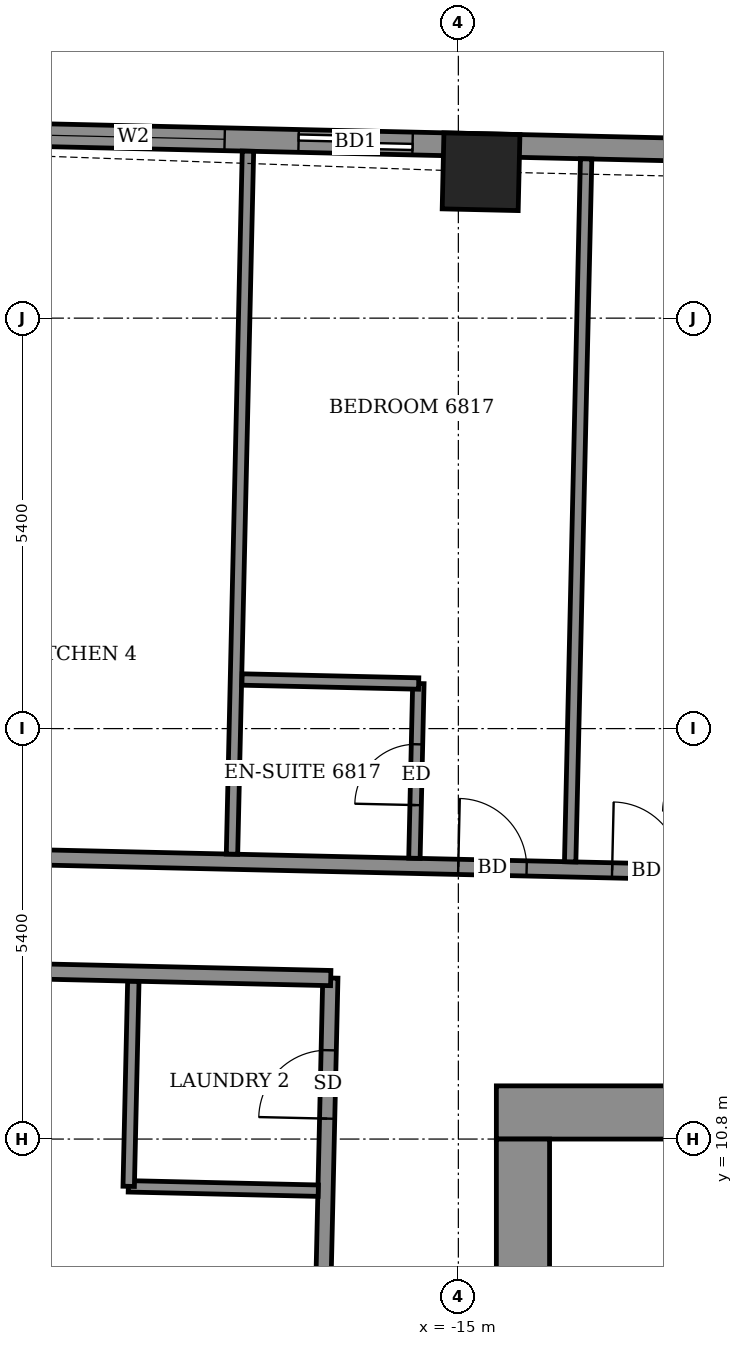
"""IFC4 building model, lengths in metres.
Left out: names, types, materials, properties, quantities, classifications, styles, units other than length and angle.
Written with IfcOpenShell. Run it as: python <this file> out.ifc"""

import sys

from ifc_helpers import new_model, si_unit, direction, frame, frame_2d, origin, origin_2d, place, context, subcontext, project, spatial, rectangle, extrude, element, fill, save


model = new_model("IFC4")
c1 = context("Model", 3, precision=1e-05, world=origin(), true_north=direction((0.0, 1.0)))
c2 = subcontext(c1, "Body", "Model", "MODEL_VIEW")
j1 = project(units=[si_unit("LENGTHUNIT", "METRE"), si_unit("PLANEANGLEUNIT", "RADIAN")], contexts=[c1])
p1 = place(None, origin())
s1 = spatial("IfcSite", under=j1, at=p1, CompositionType="ELEMENT")
p2 = place(p1, origin())
s2 = spatial("IfcBuilding", under=s1, at=p2, CompositionType="ELEMENT")
p3 = place(p2, frame((0.0, 0.0, 268.1)))
s3 = spatial("IfcBuildingStorey", under=s2, at=p3, CompositionType="ELEMENT", Elevation=268.1)
p4 = place(p3, frame((-14.701, 23.526, -0.55), z_axis=(0.0, 0.0, 1.0), x_axis=(-0.999741948423, 0.022716438162, 0.0)))
e1 = element("IfcColumn", 1, at=p4, inside=s3, PredefinedType="COLUMN", context=c2, shape_type="SweptSolid", body=[
    extrude(rectangle(XDim=1.0, YDim=1.0, at=origin_2d()), origin(), (0.0, 0.0, 1.0), 3.6),
])
p5 = place(p3, frame((26.35, 22.945, 0.0), z_axis=(0.0, 0.0, 1.0), x_axis=(-0.999742523712, 0.022691105788, 0.0)))
e2 = element("IfcWall", 2, at=p5, inside=s3, PredefinedType="SOLIDWALL", context=c2, shape_type="SweptSolid", body=[
    extrude(rectangle(XDim=47.771, YDim=0.3, at=frame_2d((23.886, 0.0))), origin(), (0.0, 0.0, 1.0), 2.55),
])
p6 = place(p5, frame((1.954, 0.0, 0.0)))
e3 = element("IfcOpeningElement", 3, at=p6, cuts=e2, PredefinedType="OPENING", context=c2, shape_type="SweptSolid", body=[
    extrude(rectangle(XDim=1.5, YDim=2.4, at=frame_2d((0.75, 1.2))), frame((0.0, 0.16, 0.0), z_axis=(0.0, -1.0, 0.0), x_axis=(1.0, 0.0, 0.0)), (0.0, 0.0, 1.0), 0.32),
])
p7 = place(p5, frame((7.37, 0.0, 0.0)))
e4 = element("IfcOpeningElement", 4, at=p7, cuts=e2, PredefinedType="OPENING", context=c2, shape_type="SweptSolid", body=[
    extrude(rectangle(XDim=1.5, YDim=2.4, at=frame_2d((0.75, 1.2))), frame((0.0, 0.16, 0.0), z_axis=(0.0, -1.0, 0.0), x_axis=(1.0, 0.0, 0.0)), (0.0, 0.0, 1.0), 0.32),
])
p8 = place(p5, frame((10.554, 0.0, 0.0)))
e5 = element("IfcOpeningElement", 5, at=p8, cuts=e2, PredefinedType="OPENING", context=c2, shape_type="SweptSolid", body=[
    extrude(rectangle(XDim=1.5, YDim=2.4, at=frame_2d((0.75, 1.2))), frame((0.0, 0.16, 0.0), z_axis=(0.0, -1.0, 0.0), x_axis=(1.0, 0.0, 0.0)), (0.0, 0.0, 1.0), 0.32),
])
p9 = place(p5, frame((15.104, 0.0, 0.0)))
e6 = element("IfcOpeningElement", 6, at=p9, cuts=e2, PredefinedType="OPENING", context=c2, shape_type="SweptSolid", body=[
    extrude(rectangle(XDim=1.5, YDim=2.4, at=frame_2d((0.75, 1.2))), frame((0.0, 0.16, 0.0), z_axis=(0.0, -1.0, 0.0), x_axis=(1.0, 0.0, 0.0)), (0.0, 0.0, 1.0), 0.32),
])
p10 = place(p5, frame((18.287, 0.0, 0.0)))
e7 = element("IfcOpeningElement", 7, at=p10, cuts=e2, PredefinedType="OPENING", context=c2, shape_type="SweptSolid", body=[
    extrude(rectangle(XDim=1.5, YDim=2.4, at=frame_2d((0.75, 1.2))), frame((0.0, 0.16, 0.0), z_axis=(0.0, -1.0, 0.0), x_axis=(1.0, 0.0, 0.0)), (0.0, 0.0, 1.0), 0.32),
])
p11 = place(p5, frame((23.622, 0.0, 0.0)))
e8 = element("IfcOpeningElement", 8, at=p11, cuts=e2, PredefinedType="OPENING", context=c2, shape_type="SweptSolid", body=[
    extrude(rectangle(XDim=1.5, YDim=2.4, at=frame_2d((0.75, 1.2))), frame((0.0, 0.16, 0.0), z_axis=(0.0, -1.0, 0.0), x_axis=(1.0, 0.0, 0.0)), (0.0, 0.0, 1.0), 0.32),
])
p12 = place(p5, frame((28.521, 0.0, 0.0)))
e9 = element("IfcOpeningElement", 9, at=p12, cuts=e2, PredefinedType="OPENING", context=c2, shape_type="SweptSolid", body=[
    extrude(rectangle(XDim=1.5, YDim=2.4, at=frame_2d((0.75, 1.2))), frame((0.0, 0.16, 0.0), z_axis=(0.0, -1.0, 0.0), x_axis=(1.0, 0.0, 0.0)), (0.0, 0.0, 1.0), 0.32),
])
p13 = place(p5, frame((31.705, 0.0, 0.0)))
e10 = element("IfcOpeningElement", 10, at=p13, cuts=e2, PredefinedType="OPENING", context=c2, shape_type="SweptSolid", body=[
    extrude(rectangle(XDim=1.5, YDim=2.4, at=frame_2d((0.75, 1.2))), frame((0.0, 0.16, 0.0), z_axis=(0.0, -1.0, 0.0), x_axis=(1.0, 0.0, 0.0)), (0.0, 0.0, 1.0), 0.32),
])
p14 = place(p5, frame((36.722, 0.0, 0.0)))
e11 = element("IfcOpeningElement", 11, at=p14, cuts=e2, PredefinedType="OPENING", context=c2, shape_type="SweptSolid", body=[
    extrude(rectangle(XDim=1.5, YDim=2.4, at=frame_2d((0.75, 1.2))), frame((0.0, 0.16, 0.0), z_axis=(0.0, -1.0, 0.0), x_axis=(1.0, 0.0, 0.0)), (0.0, 0.0, 1.0), 0.32),
])
p15 = place(p5, frame((41.963, 0.0, 0.0)))
e12 = element("IfcOpeningElement", 12, at=p15, cuts=e2, PredefinedType="OPENING", context=c2, shape_type="SweptSolid", body=[
    extrude(rectangle(XDim=1.5, YDim=2.4, at=frame_2d((0.75, 1.2))), frame((0.0, 0.16, 0.0), z_axis=(0.0, -1.0, 0.0), x_axis=(1.0, 0.0, 0.0)), (0.0, 0.0, 1.0), 0.32),
])
p16 = place(p5, frame((44.436, 0.0, 0.9)))
e13 = element("IfcOpeningElement", 13, at=p16, cuts=e2, PredefinedType="OPENING", context=c2, shape_type="SweptSolid", body=[
    extrude(rectangle(XDim=2.4, YDim=1.5, at=frame_2d((1.2, 0.75))), frame((0.0, 0.16, 0.0), z_axis=(0.0, -1.0, 0.0), x_axis=(1.0, 0.0, 0.0)), (0.0, 0.0, 1.0), 0.32),
])
p17 = place(p3, frame((-17.262, -12.525, 0.0), z_axis=(0.0, 0.0, 1.0), x_axis=(0.022706151961, 0.999742182097, 0.0)))
e14 = element("IfcWall", 14, at=p17, inside=s3, PredefinedType="PARTITIONING", context=c2, shape_type="SweptSolid", body=[
    extrude(rectangle(XDim=25.45, YDim=0.2, at=frame_2d((12.725, 0.0))), origin(), (0.0, 0.0, 1.0), 3.05),
])
p18 = place(p17, frame((19.913, 0.0, 0.0)))
e15 = element("IfcOpeningElement", 15, at=p18, cuts=e14, PredefinedType="OPENING", context=c2, shape_type="SweptSolid", body=[
    extrude(rectangle(XDim=1.0, YDim=2.1, at=frame_2d((0.5, 1.05))), frame((0.0, 0.11, 0.0), z_axis=(0.0, -1.0, 0.0), x_axis=(1.0, 0.0, 0.0)), (0.0, 0.0, 1.0), 0.22),
])
p19 = place(p17, frame((23.6, 0.0, 0.0)))
e16 = element("IfcOpeningElement", 16, at=p19, cuts=e14, PredefinedType="OPENING", context=c2, shape_type="SweptSolid", body=[
    extrude(rectangle(XDim=0.9, YDim=2.1, at=frame_2d((0.45, 1.05))), frame((0.0, 0.11, 0.0), z_axis=(0.0, -1.0, 0.0), x_axis=(1.0, 0.0, 0.0)), (0.0, 0.0, 1.0), 0.22),
])
p20 = place(p17, frame((14.325, 0.0, 0.0)))
e17 = element("IfcOpeningElement", 17, at=p20, cuts=e14, PredefinedType="OPENING", context=c2, shape_type="SweptSolid", body=[
    extrude(rectangle(XDim=1.0, YDim=2.1, at=frame_2d((0.5, 1.05))), frame((0.0, 0.11, 0.0), z_axis=(0.0, -1.0, 0.0), x_axis=(1.0, 0.0, 0.0)), (0.0, 0.0, 1.0), 0.22),
])
p21 = place(p17, frame((16.525, 0.0, 0.0)))
e18 = element("IfcOpeningElement", 18, at=p21, cuts=e14, PredefinedType="OPENING", context=c2, shape_type="SweptSolid", body=[
    extrude(rectangle(XDim=0.9, YDim=2.1, at=frame_2d((0.45, 1.05))), frame((0.0, 0.11, 0.0), z_axis=(0.0, -1.0, 0.0), x_axis=(1.0, 0.0, 0.0)), (0.0, 0.0, 1.0), 0.22),
])
p22 = place(p17, frame((9.85, 0.0, 0.0)))
e19 = element("IfcOpeningElement", 19, at=p22, cuts=e14, PredefinedType="OPENING", context=c2, shape_type="SweptSolid", body=[
    extrude(rectangle(XDim=1.0, YDim=2.1, at=frame_2d((0.5, 1.05))), frame((0.0, 0.11, 0.0), z_axis=(0.0, -1.0, 0.0), x_axis=(1.0, 0.0, 0.0)), (0.0, 0.0, 1.0), 0.22),
])
p23 = place(p17, frame((12.125, 0.0, 0.0)))
e20 = element("IfcOpeningElement", 20, at=p23, cuts=e14, PredefinedType="OPENING", context=c2, shape_type="SweptSolid", body=[
    extrude(rectangle(XDim=0.9, YDim=2.1, at=frame_2d((0.45, 1.05))), frame((0.0, 0.11, 0.0), z_axis=(0.0, -1.0, 0.0), x_axis=(1.0, 0.0, 0.0)), (0.0, 0.0, 1.0), 0.22),
])
p24 = place(p17, frame((7.725, 0.0, 0.0)))
e21 = element("IfcOpeningElement", 21, at=p24, cuts=e14, PredefinedType="OPENING", context=c2, shape_type="SweptSolid", body=[
    extrude(rectangle(XDim=1.0, YDim=2.1, at=frame_2d((0.5, 1.05))), frame((0.0, 0.11, 0.0), z_axis=(0.0, -1.0, 0.0), x_axis=(1.0, 0.0, 0.0)), (0.0, 0.0, 1.0), 0.22),
])
p25 = place(p17, frame((5.275, 0.0, 0.0)))
e22 = element("IfcOpeningElement", 22, at=p25, cuts=e14, PredefinedType="OPENING", context=c2, shape_type="SweptSolid", body=[
    extrude(rectangle(XDim=0.9, YDim=2.1, at=frame_2d((0.45, 1.05))), frame((0.0, 0.11, 0.0), z_axis=(0.0, -1.0, 0.0), x_axis=(1.0, 0.0, 0.0)), (0.0, 0.0, 1.0), 0.22),
])
p26 = place(p17, frame((0.512, 0.0, 0.0)))
e23 = element("IfcOpeningElement", 23, at=p26, cuts=e14, PredefinedType="OPENING", context=c2, shape_type="SweptSolid", body=[
    extrude(rectangle(XDim=1.0, YDim=2.1, at=frame_2d((0.5, 1.05))), frame((0.0, 0.11, 0.0), z_axis=(0.0, -1.0, 0.0), x_axis=(1.0, 0.0, 0.0)), (0.0, 0.0, 1.0), 0.22),
])
p27 = place(p17, frame((2.775, 0.0, 0.0)))
e24 = element("IfcOpeningElement", 24, at=p27, cuts=e14, PredefinedType="OPENING", context=c2, shape_type="SweptSolid", body=[
    extrude(rectangle(XDim=0.9, YDim=2.1, at=frame_2d((0.45, 1.05))), frame((0.0, 0.11, 0.0), z_axis=(0.0, -1.0, 0.0), x_axis=(1.0, 0.0, 0.0)), (0.0, 0.0, 1.0), 0.22),
])
p28 = place(p3, frame((-19.342, 10.178, 0.0), z_axis=(0.0, 0.0, 1.0), x_axis=(0.999741028149, -0.022756903044, 0.0)))
e25 = element("IfcWall", 25, at=p28, inside=s3, PredefinedType="PARTITIONING", context=c2, shape_type="SweptSolid", body=[
    extrude(rectangle(XDim=2.5, YDim=0.15, at=frame_2d((1.25, 0.0))), origin(), (0.0, 0.0, 1.0), 3.05),
])
p29 = place(p3, frame((-19.337, 10.178, 0.0), z_axis=(0.0, 0.0, 1.0), x_axis=(0.02260842146, 0.999744396973, 0.0)))
e26 = element("IfcWall", 26, at=p29, inside=s3, PredefinedType="PARTITIONING", context=c2, shape_type="SweptSolid", body=[
    extrude(rectangle(XDim=2.7, YDim=0.15, at=frame_2d((1.35, 0.0))), origin(), (0.0, 0.0, 1.0), 3.05),
])
p30 = place(p3, frame((-24.508, 13.096, 0.0), z_axis=(0.0, 0.0, 1.0), x_axis=(0.99974170677, -0.022727070732, 0.0)))
e27 = element("IfcWall", 27, at=p30, inside=s3, PredefinedType="PARTITIONING", context=c2, shape_type="SweptSolid", body=[
    extrude(rectangle(XDim=7.831, YDim=0.2, at=frame_2d((3.916, 0.0))), origin(), (0.0, 0.0, 1.0), 3.05),
])
p31 = place(p3, frame((-24.474, 14.596, 0.0), z_axis=(0.0, 0.0, 1.0), x_axis=(0.999742424031, -0.022695497208, 0.0)))
e28 = element("IfcWall", 28, at=p31, inside=s3, PredefinedType="PARTITIONING", context=c2, shape_type="SweptSolid", body=[
    extrude(rectangle(XDim=52.872, YDim=0.2, at=frame_2d((26.436, 0.0))), origin(), (0.0, 0.0, 1.0), 3.05),
])
p32 = place(p31, frame((51.161, 0.0, 0.0)))
e29 = element("IfcOpeningElement", 29, at=p32, cuts=e28, PredefinedType="OPENING", context=c2, shape_type="SweptSolid", body=[
    extrude(rectangle(XDim=1.0, YDim=2.1, at=frame_2d((0.5, 1.05))), frame((0.0, 0.11, 0.0), z_axis=(0.0, -1.0, 0.0), x_axis=(1.0, 0.0, 0.0)), (0.0, 0.0, 1.0), 0.22),
])
p33 = place(p31, frame((46.7, 0.0, 0.0)))
e30 = element("IfcOpeningElement", 30, at=p33, cuts=e28, PredefinedType="OPENING", context=c2, shape_type="SweptSolid", body=[
    extrude(rectangle(XDim=0.9, YDim=2.1, at=frame_2d((0.45, 1.05))), frame((0.0, 0.11, 0.0), z_axis=(0.0, -1.0, 0.0), x_axis=(1.0, 0.0, 0.0)), (0.0, 0.0, 1.0), 0.22),
])
p34 = place(p31, frame((44.3, 0.0, 0.0)))
e31 = element("IfcOpeningElement", 31, at=p34, cuts=e28, PredefinedType="OPENING", context=c2, shape_type="SweptSolid", body=[
    extrude(rectangle(XDim=0.9, YDim=2.1, at=frame_2d((0.45, 1.05))), frame((0.0, 0.11, 0.0), z_axis=(0.0, -1.0, 0.0), x_axis=(1.0, 0.0, 0.0)), (0.0, 0.0, 1.0), 0.22),
])
p35 = place(p31, frame((37.575, 0.0, 0.0)))
e32 = element("IfcOpeningElement", 32, at=p35, cuts=e28, PredefinedType="OPENING", context=c2, shape_type="SweptSolid", body=[
    extrude(rectangle(XDim=0.9, YDim=2.1, at=frame_2d((0.45, 1.05))), frame((0.0, 0.11, 0.0), z_axis=(0.0, -1.0, 0.0), x_axis=(1.0, 0.0, 0.0)), (0.0, 0.0, 1.0), 0.22),
])
p36 = place(p31, frame((35.675, 0.0, 0.0)))
e33 = element("IfcOpeningElement", 33, at=p36, cuts=e28, PredefinedType="OPENING", context=c2, shape_type="SweptSolid", body=[
    extrude(rectangle(XDim=0.9, YDim=2.1, at=frame_2d((0.45, 1.05))), frame((0.0, 0.11, 0.0), z_axis=(0.0, -1.0, 0.0), x_axis=(1.0, 0.0, 0.0)), (0.0, 0.0, 1.0), 0.22),
])
p37 = place(p31, frame((28.95, 0.0, 0.0)))
e34 = element("IfcOpeningElement", 34, at=p37, cuts=e28, PredefinedType="OPENING", context=c2, shape_type="SweptSolid", body=[
    extrude(rectangle(XDim=0.9, YDim=2.1, at=frame_2d((0.45, 1.05))), frame((0.0, 0.11, 0.0), z_axis=(0.0, -1.0, 0.0), x_axis=(1.0, 0.0, 0.0)), (0.0, 0.0, 1.0), 0.22),
])
p38 = place(p31, frame((27.0, 0.0, 0.0)))
e35 = element("IfcOpeningElement", 35, at=p38, cuts=e28, PredefinedType="OPENING", context=c2, shape_type="SweptSolid", body=[
    extrude(rectangle(XDim=0.9, YDim=2.1, at=frame_2d((0.45, 1.05))), frame((0.0, 0.11, 0.0), z_axis=(0.0, -1.0, 0.0), x_axis=(1.0, 0.0, 0.0)), (0.0, 0.0, 1.0), 0.22),
])
p39 = place(p31, frame((20.2, 0.0, 0.0)))
e36 = element("IfcOpeningElement", 36, at=p39, cuts=e28, PredefinedType="OPENING", context=c2, shape_type="SweptSolid", body=[
    extrude(rectangle(XDim=0.9, YDim=2.1, at=frame_2d((0.45, 1.05))), frame((0.0, 0.11, 0.0), z_axis=(0.0, -1.0, 0.0), x_axis=(1.0, 0.0, 0.0)), (0.0, 0.0, 1.0), 0.22),
])
p40 = place(p31, frame((18.25, 0.0, 0.0)))
e37 = element("IfcOpeningElement", 37, at=p40, cuts=e28, PredefinedType="OPENING", context=c2, shape_type="SweptSolid", body=[
    extrude(rectangle(XDim=0.9, YDim=2.1, at=frame_2d((0.45, 1.05))), frame((0.0, 0.11, 0.0), z_axis=(0.0, -1.0, 0.0), x_axis=(1.0, 0.0, 0.0)), (0.0, 0.0, 1.0), 0.22),
])
p41 = place(p31, frame((11.5, 0.0, 0.0)))
e38 = element("IfcOpeningElement", 38, at=p41, cuts=e28, PredefinedType="OPENING", context=c2, shape_type="SweptSolid", body=[
    extrude(rectangle(XDim=0.9, YDim=2.1, at=frame_2d((0.45, 1.05))), frame((0.0, 0.11, 0.0), z_axis=(0.0, -1.0, 0.0), x_axis=(1.0, 0.0, 0.0)), (0.0, 0.0, 1.0), 0.22),
])
p42 = place(p31, frame((9.475, 0.0, 0.0)))
e39 = element("IfcOpeningElement", 39, at=p42, cuts=e28, PredefinedType="OPENING", context=c2, shape_type="SweptSolid", body=[
    extrude(rectangle(XDim=0.9, YDim=2.1, at=frame_2d((0.45, 1.05))), frame((0.0, 0.11, 0.0), z_axis=(0.0, -1.0, 0.0), x_axis=(1.0, 0.0, 0.0)), (0.0, 0.0, 1.0), 0.22),
])
p43 = place(p31, frame((2.293, 0.0, 0.0)))
e40 = element("IfcOpeningElement", 40, at=p43, cuts=e28, PredefinedType="OPENING", context=c2, shape_type="SweptSolid", body=[
    extrude(rectangle(XDim=1.0, YDim=2.1, at=frame_2d((0.5, 1.05))), frame((0.0, 0.11, 0.0), z_axis=(0.0, -1.0, 0.0), x_axis=(1.0, 0.0, 0.0)), (0.0, 0.0, 1.0), 0.22),
])
p44 = place(p3, frame((-17.978, 14.548, 0.0), z_axis=(0.0, 0.0, 1.0), x_axis=(0.022698023584, 0.999742366675, 0.0)))
e41 = element("IfcWall", 41, at=p44, inside=s3, PredefinedType="PARTITIONING", context=c2, shape_type="SweptSolid", body=[
    extrude(rectangle(XDim=9.25, YDim=0.15, at=frame_2d((4.625, 0.0))), origin(), (0.0, 0.0, 1.0), 2.55),
])
p45 = place(p3, frame((-15.578, 14.494, 0.0), z_axis=(0.0, 0.0, 1.0), x_axis=(0.022612884682, 0.999744296031, 0.0)))
e42 = element("IfcWall", 42, at=p45, inside=s3, PredefinedType="PARTITIONING", context=c2, shape_type="SweptSolid", body=[
    extrude(rectangle(XDim=2.3, YDim=0.15, at=frame_2d((1.15, 0.0))), origin(), (0.0, 0.0, 1.0), 3.05),
])
p46 = place(p45, frame((0.7, 0.0, 0.0)))
e43 = element("IfcOpeningElement", 43, at=p46, cuts=e42, PredefinedType="OPENING", context=c2, shape_type="SweptSolid", body=[
    extrude(rectangle(XDim=0.8, YDim=2.1, at=frame_2d((0.4, 1.05))), frame((0.0, 0.085, 0.0), z_axis=(0.0, -1.0, 0.0), x_axis=(1.0, 0.0, 0.0)), (0.0, 0.0, 1.0), 0.17),
])
p47 = place(p3, frame((-13.529, 14.447, 0.0), z_axis=(0.0, 0.0, 1.0), x_axis=(0.022697424684, 0.999742380272, 0.0)))
e44 = element("IfcWall", 44, at=p47, inside=s3, PredefinedType="PARTITIONING", context=c2, shape_type="SweptSolid", body=[
    extrude(rectangle(XDim=9.25, YDim=0.15, at=frame_2d((4.625, 0.0))), origin(), (0.0, 0.0, 1.0), 2.55),
])
p48 = place(p3, frame((-17.846, 16.846, 0.0), z_axis=(0.0, 0.0, 1.0), x_axis=(0.999740260747, -0.02279059109, 0.0)))
e45 = element("IfcWall", 45, at=p48, inside=s3, PredefinedType="PARTITIONING", context=c2, shape_type="SweptSolid", body=[
    extrude(rectangle(XDim=2.324, YDim=0.15, at=frame_2d((1.162, 0.0))), origin(), (0.0, 0.0, 1.0), 3.05),
])
p49 = place(p3, frame((-14.5, 11.15, 0.0), z_axis=(0.0, 0.0, 1.0), x_axis=(1.0, 0.0, 0.0)))
e46 = element("IfcWall", 46, at=p49, inside=s3, PredefinedType="SHEAR", context=c2, shape_type="SweptSolid", body=[
    extrude(rectangle(XDim=29.0, YDim=0.7, at=frame_2d((14.5, 0.0))), origin(), (0.0, 0.0, 1.0), 3.6),
])
p50 = place(p3, frame((-14.15, -10.8, 0.0), z_axis=(0.0, 0.0, 1.0), x_axis=(0.0, 1.0, 0.0)))
e47 = element("IfcWall", 47, at=p50, inside=s3, PredefinedType="SHEAR", context=c2, shape_type="SweptSolid", body=[
    extrude(rectangle(XDim=21.6, YDim=0.7, at=frame_2d((10.8, 0.0))), origin(), (0.0, 0.0, 1.0), 3.6),
])
p51 = place(p50, frame((8.25, 0.0, 0.0)))
e48 = element("IfcOpeningElement", 48, at=p51, cuts=e47, PredefinedType="OPENING", context=c2, shape_type="SweptSolid", body=[
    extrude(rectangle(XDim=1.2, YDim=2.1, at=frame_2d((0.6, 1.05))), frame((0.0, 0.36, 0.0), z_axis=(0.0, -1.0, 0.0), x_axis=(1.0, 0.0, 0.0)), (0.0, 0.0, 1.0), 0.72),
])
p52 = place(p50, frame((15.25, 0.0, 0.0)))
e49 = element("IfcOpeningElement", 49, at=p52, cuts=e47, PredefinedType="OPENING", context=c2, shape_type="SweptSolid", body=[
    extrude(rectangle(XDim=1.2, YDim=2.1, at=frame_2d((0.6, 1.05))), frame((0.0, 0.36, 0.0), z_axis=(0.0, -1.0, 0.0), x_axis=(1.0, 0.0, 0.0)), (0.0, 0.0, 1.0), 0.72),
])
p53 = place(p15, origin())
e50 = element("IfcDoor", 50, at=p53, inside=s3, OperationType="SLIDING_TO_LEFT", PredefinedType="DOOR", context=c2, shape_type="SweptSolid", body=[
    extrude(rectangle(XDim=1.5, YDim=2.4, at=frame_2d((0.75, 1.2))), frame((0.0, 0.025, 0.0), z_axis=(0.0, -1.0, 0.0), x_axis=(1.0, 0.0, 0.0)), (0.0, 0.0, 1.0), 0.05),
])
fill(e12, e50)
p54 = place(p16, origin())
e51 = element("IfcWindow", 51, at=p54, inside=s3, PartitioningType="DOUBLE_PANEL_VERTICAL", PredefinedType="WINDOW", context=c2, shape_type="SweptSolid", body=[
    extrude(rectangle(XDim=2.4, YDim=1.5, at=frame_2d((1.2, 0.75))), frame((0.0, 0.03, 0.0), z_axis=(0.0, -1.0, 0.0), x_axis=(1.0, 0.0, 0.0)), (0.0, 0.0, 1.0), 0.06),
])
fill(e13, e51)
p55 = place(p41, origin())
e52 = element("IfcDoor", 52, at=p55, inside=s3, OperationType="SINGLE_SWING_RIGHT", PredefinedType="DOOR", context=c2, shape_type="SweptSolid", body=[
    extrude(rectangle(XDim=0.9, YDim=2.1, at=frame_2d((0.45, 1.05))), frame((0.0, 0.025, 0.0), z_axis=(0.0, -1.0, 0.0), x_axis=(1.0, 0.0, 0.0)), (0.0, 0.0, 1.0), 0.05),
])
fill(e38, e52)
p56 = place(p42, origin())
e53 = element("IfcDoor", 53, at=p56, inside=s3, OperationType="SINGLE_SWING_LEFT", PredefinedType="DOOR", context=c2, shape_type="SweptSolid", body=[
    extrude(rectangle(XDim=0.9, YDim=2.1, at=frame_2d((0.45, 1.05))), frame((0.0, 0.025, 0.0), z_axis=(0.0, -1.0, 0.0), x_axis=(1.0, 0.0, 0.0)), (0.0, 0.0, 1.0), 0.05),
])
fill(e39, e53)
p57 = place(p46, origin())
e54 = element("IfcDoor", 54, at=p57, inside=s3, OperationType="SINGLE_SWING_LEFT", PredefinedType="DOOR", context=c2, shape_type="SweptSolid", body=[
    extrude(rectangle(XDim=0.8, YDim=2.1, at=frame_2d((0.4, 1.05))), frame((0.0, 0.025, 0.0), z_axis=(0.0, -1.0, 0.0), x_axis=(1.0, 0.0, 0.0)), (0.0, 0.0, 1.0), 0.05),
])
fill(e43, e54)
p58 = place(p19, origin())
e55 = element("IfcDoor", 55, at=p58, inside=s3, OperationType="SINGLE_SWING_LEFT", PredefinedType="DOOR", context=c2, shape_type="SweptSolid", body=[
    extrude(rectangle(XDim=0.9, YDim=2.1, at=frame_2d((0.45, 1.05))), frame((0.0, 0.025, 0.0), z_axis=(0.0, -1.0, 0.0), x_axis=(1.0, 0.0, 0.0)), (0.0, 0.0, 1.0), 0.05),
])
fill(e16, e55)
save(model, sys.argv[1])
